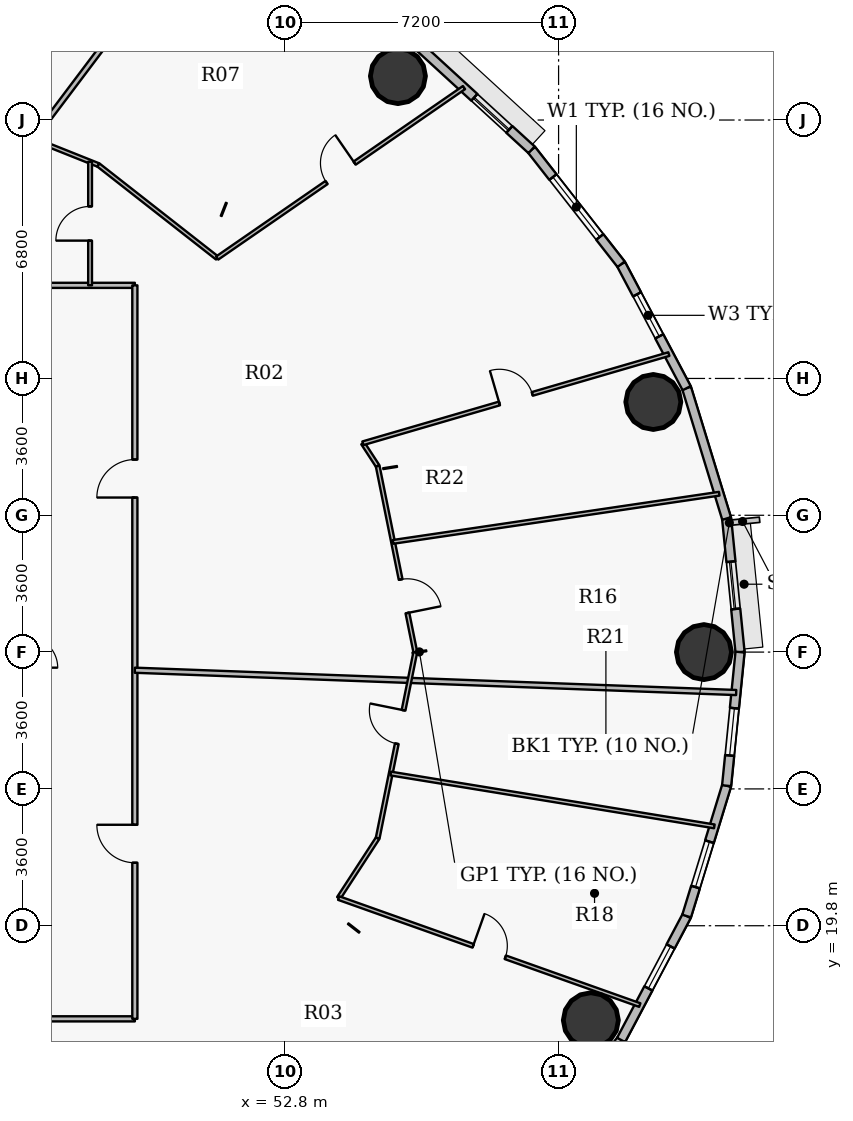
"""IFC4 building model, lengths in metres.
Left out: names, types, materials, properties, quantities, classifications, styles, units other than length and angle.
Written with IfcOpenShell. Run it as: python <this file> out.ifc"""

import sys

from ifc_helpers import new_model, si_unit, direction, frame, frame_2d, origin, origin_2d, place, context, subcontext, project, spatial, rectangle, hollow_circle, extrude, source, transform, mapped, element, fill, save


model = new_model("IFC4")
c1 = context("Model", 3, precision=1e-05, world=origin(), true_north=direction((0.0, 1.0)))
c2 = subcontext(c1, "Body", "Model", "MODEL_VIEW")
j1 = project(units=[si_unit("LENGTHUNIT", "METRE"), si_unit("PLANEANGLEUNIT", "RADIAN")], contexts=[c1])
p1 = place(None, origin())
s1 = spatial("IfcSite", under=j1, at=p1, CompositionType="ELEMENT")
p2 = place(p1, origin())
s2 = spatial("IfcBuilding", under=s1, at=p2, CompositionType="ELEMENT")
p3 = place(p2, frame((0.0, 0.0, 112.2)))
s3 = spatial("IfcBuildingStorey", under=s2, at=p3, CompositionType="ELEMENT", Elevation=112.2)
for number, where, z_axis, x_axis in (
    (1, (63.825, 27.0, 0.0), (0.0, 0.0, 1.0), (1.0, 0.0, 0.0)),
    (2, (62.493, 33.581, 0.0), (0.0, 0.0, 1.0), (1.0, 0.0, 0.0)),
    (3, (55.773, 42.156, 0.0), (0.0, 0.0, 1.0), (1.0, 0.0, 0.0)),
    (4, (60.849, 17.312, 0.0), (0.0, 0.0, 1.0), (1.0, 0.0, 0.0)),
):
    element("IfcColumn", number, at=place(p3, frame(where, z_axis=z_axis, x_axis=x_axis)), inside=s3, PredefinedType="COLUMN", context=c2, shape_type="SweptSolid", body=[
        extrude(hollow_circle(Radius=0.725, WallThickness=0.042, at=origin_2d()), origin(), (0.0, 0.0, 1.0), 3.75),
    ])
p4 = place(p3, frame((64.422, 30.515, 0.0), z_axis=(0.0, 0.0, 1.0), x_axis=(0.099989468229, -0.994988495533, 0.0)))
e5 = element("IfcWall", 5, at=p4, inside=s3, PredefinedType="SOLIDWALL", context=c2, shape_type="SweptSolid", body=[
    extrude(rectangle(XDim=3.533, YDim=0.24, at=frame_2d((1.767, 0.0))), origin(), (0.0, 0.0, 1.0), 3.5),
])
p5 = place(p4, frame((1.142, 0.0, 0.9)))
e6 = element("IfcOpeningElement", 6, at=p5, cuts=e5, PredefinedType="OPENING", context=c2, shape_type="SweptSolid", body=[
    extrude(rectangle(XDim=1.25, YDim=1.65, at=origin_2d()), frame((0.625, 0.13, 0.825), z_axis=(0.0, -1.0, 0.0), x_axis=(1.0, 0.0, 0.0)), (0.0, 0.0, 1.0), 0.26),
])
p6 = place(p3, frame((63.37, 33.945, 0.0), z_axis=(0.0, 0.0, 1.0), x_axis=(0.293124431344, -0.956074300329, 0.0)))
e7 = element("IfcWall", 7, at=p6, inside=s3, PredefinedType="SOLIDWALL", context=c2, shape_type="SweptSolid", body=[
    extrude(rectangle(XDim=3.587, YDim=0.24, at=frame_2d((1.793, 0.0))), origin(), (0.0, 0.0, 1.0), 3.5),
])
p7 = place(p3, frame((61.645, 37.206, 0.0), z_axis=(0.0, 0.0, 1.0), x_axis=(0.467614004126, -0.883932770716, 0.0)))
e8 = element("IfcWall", 8, at=p7, inside=s3, PredefinedType="SOLIDWALL", context=c2, shape_type="SweptSolid", body=[
    extrude(rectangle(XDim=3.689, YDim=0.24, at=frame_2d((1.844, 0.0))), origin(), (0.0, 0.0, 1.0), 3.5),
])
p8 = place(p7, frame((0.896, 0.0, 0.9)))
e9 = element("IfcOpeningElement", 9, at=p8, cuts=e8, PredefinedType="OPENING", context=c2, shape_type="SweptSolid", body=[
    extrude(rectangle(XDim=1.25, YDim=1.65, at=origin_2d()), frame((0.625, 0.13, 0.825), z_axis=(0.0, -1.0, 0.0), x_axis=(1.0, 0.0, 0.0)), (0.0, 0.0, 1.0), 0.26),
])
p9 = place(p3, frame((59.289, 40.217, 0.0), z_axis=(0.0, 0.0, 1.0), x_axis=(0.616272103517, -0.787533297345, 0.0)))
e10 = element("IfcWall", 10, at=p9, inside=s3, PredefinedType="SOLIDWALL", context=c2, shape_type="SweptSolid", body=[
    extrude(rectangle(XDim=3.823, YDim=0.24, at=frame_2d((1.912, 0.0))), origin(), (0.0, 0.0, 1.0), 3.5),
])
p10 = place(p9, frame((0.912, 0.0, 0.9)))
e11 = element("IfcOpeningElement", 11, at=p10, cuts=e10, PredefinedType="OPENING", context=c2, shape_type="SweptSolid", body=[
    extrude(rectangle(XDim=2.0, YDim=1.75, at=origin_2d()), frame((1.0, 0.13, 0.875), z_axis=(0.0, -1.0, 0.0), x_axis=(1.0, 0.0, 0.0)), (0.0, 0.0, 1.0), 0.26),
])
p11 = place(p3, frame((56.358, 42.903, 0.0), z_axis=(0.0, 0.0, 1.0), x_axis=(0.737113356241, -0.675769117414, 0.0)))
e12 = element("IfcWall", 12, at=p11, inside=s3, PredefinedType="SOLIDWALL", context=c2, shape_type="SweptSolid", body=[
    extrude(rectangle(XDim=3.976, YDim=0.24, at=frame_2d((1.988, 0.0))), origin(), (0.0, 0.0, 1.0), 3.5),
])
p12 = place(p11, frame((1.933, 0.0, 0.9)))
e13 = element("IfcOpeningElement", 13, at=p12, cuts=e12, PredefinedType="OPENING", context=c2, shape_type="SweptSolid", body=[
    extrude(rectangle(XDim=1.25, YDim=1.65, at=origin_2d()), frame((0.625, 0.13, 0.825), z_axis=(0.0, -1.0, 0.0), x_axis=(1.0, 0.0, 0.0)), (0.0, 0.0, 1.0), 0.26),
])
p13 = place(p3, frame((61.645, 16.794, 0.0), z_axis=(0.0, 0.0, 1.0), x_axis=(-0.616272103517, -0.787533297345, 0.0)))
e14 = element("IfcWall", 14, at=p13, inside=s3, PredefinedType="SOLIDWALL", context=c2, shape_type="SweptSolid", body=[
    extrude(rectangle(XDim=3.823, YDim=0.24, at=frame_2d((1.912, 0.0))), origin(), (0.0, 0.0, 1.0), 3.5),
])
p14 = place(p3, frame((63.37, 20.055, 0.0), z_axis=(0.0, 0.0, 1.0), x_axis=(-0.467614004126, -0.883932770716, 0.0)))
e15 = element("IfcWall", 15, at=p14, inside=s3, PredefinedType="SOLIDWALL", context=c2, shape_type="SweptSolid", body=[
    extrude(rectangle(XDim=3.689, YDim=0.24, at=frame_2d((1.844, 0.0))), origin(), (0.0, 0.0, 1.0), 3.5),
])
p15 = place(p14, frame((0.904, 0.0, 0.9)))
e16 = element("IfcOpeningElement", 16, at=p15, cuts=e15, PredefinedType="OPENING", context=c2, shape_type="SweptSolid", body=[
    extrude(rectangle(XDim=1.25, YDim=1.65, at=origin_2d()), frame((0.625, 0.13, 0.825), z_axis=(0.0, -1.0, 0.0), x_axis=(1.0, 0.0, 0.0)), (0.0, 0.0, 1.0), 0.26),
])
p16 = place(p3, frame((64.422, 23.485, 0.0), z_axis=(0.0, 0.0, 1.0), x_axis=(-0.293124431344, -0.956074300329, 0.0)))
e17 = element("IfcWall", 17, at=p16, inside=s3, PredefinedType="SOLIDWALL", context=c2, shape_type="SweptSolid", body=[
    extrude(rectangle(XDim=3.587, YDim=0.24, at=frame_2d((1.793, 0.0))), origin(), (0.0, 0.0, 1.0), 3.5),
])
p17 = place(p16, frame((1.541, 0.0, 0.9)))
e18 = element("IfcOpeningElement", 18, at=p17, cuts=e17, PredefinedType="OPENING", context=c2, shape_type="SweptSolid", body=[
    extrude(rectangle(XDim=1.25, YDim=1.65, at=origin_2d()), frame((0.625, 0.13, 0.825), z_axis=(0.0, -1.0, 0.0), x_axis=(1.0, 0.0, 0.0)), (0.0, 0.0, 1.0), 0.26),
])
p18 = place(p3, frame((64.775, 27.0, 0.0), z_axis=(0.0, 0.0, 1.0), x_axis=(-0.099989468229, -0.994988495533, 0.0)))
e19 = element("IfcWall", 19, at=p18, inside=s3, PredefinedType="SOLIDWALL", context=c2, shape_type="SweptSolid", body=[
    extrude(rectangle(XDim=3.533, YDim=0.24, at=frame_2d((1.767, 0.0))), origin(), (0.0, 0.0, 1.0), 3.5),
])
p19 = place(p18, frame((1.484, 0.0, 0.9)))
e20 = element("IfcOpeningElement", 20, at=p19, cuts=e19, PredefinedType="OPENING", context=c2, shape_type="SweptSolid", body=[
    extrude(rectangle(XDim=1.25, YDim=1.65, at=origin_2d()), frame((0.625, 0.13, 0.825), z_axis=(0.0, -1.0, 0.0), x_axis=(1.0, 0.0, 0.0)), (0.0, 0.0, 1.0), 0.26),
])
p20 = place(p3, frame((36.042, 36.65, 0.0), z_axis=(0.0, 0.0, 1.0), x_axis=(1.0, 0.0, 0.0)))
e21 = element("IfcWall", 21, at=p20, inside=s3, PredefinedType="PARTITIONING", context=c2, shape_type="SweptSolid", body=[
    extrude(rectangle(XDim=12.808, YDim=0.135, at=frame_2d((6.404, 0.0))), origin(), (0.0, 0.0, 1.0), 2.935),
])
p21 = place(p20, frame((3.135, 0.0, 0.0)))
e22 = element("IfcOpeningElement", 22, at=p21, cuts=e21, PredefinedType="OPENING", context=c2, shape_type="SweptSolid", body=[
    extrude(rectangle(XDim=1.0, YDim=2.15, at=origin_2d()), frame((0.5, 0.078, 1.075), z_axis=(0.0, -1.0, 0.0), x_axis=(1.0, 0.0, 0.0)), (0.0, 0.0, 1.0), 0.155),
])
p22 = place(p3, frame((38.477, 17.35, 0.0), z_axis=(0.0, 0.0, 1.0), x_axis=(1.0, 0.0, 0.0)))
e23 = element("IfcWall", 23, at=p22, inside=s3, PredefinedType="PARTITIONING", context=c2, shape_type="SweptSolid", body=[
    extrude(rectangle(XDim=10.373, YDim=0.135, at=frame_2d((5.187, 0.0))), origin(), (0.0, 0.0, 1.0), 2.935),
])
p23 = place(p3, frame((42.251, 42.066, 0.0), z_axis=(0.0, 0.0, 1.0), x_axis=(0.9288090756, -0.370558633798, 0.0)))
e24 = element("IfcWall", 24, at=p23, inside=s3, PredefinedType="PARTITIONING", context=c2, shape_type="SweptSolid", body=[
    extrude(rectangle(XDim=6.072, YDim=0.1, at=frame_2d((3.036, 0.0))), origin(), (0.0, 0.0, 1.0), 2.935),
])
p24 = place(p3, frame((43.272, 36.65, 0.0), z_axis=(0.0, 0.0, 1.0), x_axis=(0.601821582461, 0.798630567211, 0.0)))
e25 = element("IfcWall", 25, at=p24, inside=s3, PredefinedType="PARTITIONING", context=c2, shape_type="SweptSolid", body=[
    extrude(rectangle(XDim=12.127, YDim=0.135, at=frame_2d((6.063, 0.0))), origin(), (0.0, 0.0, 1.0), 2.935),
])
p25 = place(p3, frame((47.672, 36.65, 0.0), z_axis=(0.0, 0.0, 1.0), x_axis=(0.0, 1.0, 0.0)))
e26 = element("IfcWall", 26, at=p25, inside=s3, PredefinedType="PARTITIONING", context=c2, shape_type="SweptSolid", body=[
    extrude(rectangle(XDim=3.253, YDim=0.1, at=frame_2d((1.626, 0.0))), origin(), (0.0, 0.0, 1.0), 2.985),
])
p26 = place(p25, frame((1.177, 0.0, 0.0)))
e27 = element("IfcOpeningElement", 27, at=p26, cuts=e26, PredefinedType="OPENING", context=c2, shape_type="SweptSolid", body=[
    extrude(rectangle(XDim=0.9, YDim=2.1, at=origin_2d()), frame((0.45, 0.06, 1.05), z_axis=(0.0, -1.0, 0.0), x_axis=(1.0, 0.0, 0.0)), (0.0, 0.0, 1.0), 0.12),
])
p27 = place(p3, frame((47.891, 39.816, 0.0), z_axis=(0.0, 0.0, 1.0), x_axis=(0.787331052764, -0.616530464254, 0.0)))
e28 = element("IfcWall", 28, at=p27, inside=s3, PredefinedType="PARTITIONING", context=c2, shape_type="SweptSolid", body=[
    extrude(rectangle(XDim=3.969, YDim=0.1, at=frame_2d((1.985, 0.0))), origin(), (0.0, 0.0, 1.0), 2.935),
])
p28 = place(p3, frame((48.85, 17.35, 0.0), z_axis=(0.0, 0.0, 1.0), x_axis=(0.0, 1.0, 0.0)))
e29 = element("IfcWall", 29, at=p28, inside=s3, PredefinedType="PARTITIONING", context=c2, shape_type="SweptSolid", body=[
    extrude(rectangle(XDim=19.3, YDim=0.135, at=frame_2d((9.65, 0.0))), origin(), (0.0, 0.0, 1.0), 2.935),
])
p29 = place(p28, frame((4.107, 0.0, 0.0)))
e30 = element("IfcOpeningElement", 30, at=p29, cuts=e29, PredefinedType="OPENING", context=c2, shape_type="SweptSolid", body=[
    extrude(rectangle(XDim=1.0, YDim=2.15, at=origin_2d()), frame((0.5, 0.078, 1.075), z_axis=(0.0, -1.0, 0.0), x_axis=(1.0, 0.0, 0.0)), (0.0, 0.0, 1.0), 0.155),
])
p30 = place(p28, frame((13.717, 0.0, 0.0)))
e31 = element("IfcOpeningElement", 31, at=p30, cuts=e29, PredefinedType="OPENING", context=c2, shape_type="SweptSolid", body=[
    extrude(rectangle(XDim=1.0, YDim=2.15, at=origin_2d()), frame((0.5, 0.078, 1.075), z_axis=(0.0, -1.0, 0.0), x_axis=(1.0, 0.0, 0.0)), (0.0, 0.0, 1.0), 0.155),
])
p31 = place(p3, frame((48.85, 26.523, 0.0), z_axis=(0.0, 0.0, 1.0), x_axis=(0.999312212169, -0.03708237599, 0.0)))
e32 = element("IfcWall", 32, at=p31, inside=s3, PredefinedType="PARTITIONING", context=c2, shape_type="SweptSolid", body=[
    extrude(rectangle(XDim=15.834, YDim=0.135, at=frame_2d((7.917, 0.0))), origin(), (0.0, 0.0, 1.0), 2.935),
])
p32 = place(p3, frame((51.016, 37.368, 0.0), z_axis=(0.0, 0.0, 1.0), x_axis=(0.822878649823, 0.568217148338, 0.0)))
e33 = element("IfcWall", 33, at=p32, inside=s3, PredefinedType="PARTITIONING", context=c2, shape_type="SweptSolid", body=[
    extrude(rectangle(XDim=7.893, YDim=0.1, at=frame_2d((3.946, 0.0))), origin(), (0.0, 0.0, 1.0), 2.935),
])
p33 = place(p32, frame((3.497, 0.0, 0.0)))
e34 = element("IfcOpeningElement", 34, at=p33, cuts=e33, PredefinedType="OPENING", context=c2, shape_type="SweptSolid", body=[
    extrude(rectangle(XDim=0.9, YDim=2.1, at=origin_2d()), frame((0.45, 0.06, 1.05), z_axis=(0.0, -1.0, 0.0), x_axis=(1.0, 0.0, 0.0)), (0.0, 0.0, 1.0), 0.12),
])
p34 = place(p3, frame((54.214, 20.528, 0.0), z_axis=(0.0, 0.0, 1.0), x_axis=(0.545444312607, 0.838147064568, 0.0)))
e35 = element("IfcWall", 35, at=p34, inside=s3, PredefinedType="PARTITIONING", context=c2, shape_type="SweptSolid", body=[
    extrude(rectangle(XDim=1.882, YDim=0.1, at=frame_2d((0.941, 0.0))), origin(), (0.0, 0.0, 1.0), 3.5),
])
p35 = place(p3, frame((54.214, 20.528, 0.0), z_axis=(0.0, 0.0, 1.0), x_axis=(0.942277402903, -0.334833236073, 0.0)))
e36 = element("IfcWall", 36, at=p35, inside=s3, PredefinedType="PARTITIONING", context=c2, shape_type="SweptSolid", body=[
    extrude(rectangle(XDim=8.408, YDim=0.1, at=frame_2d((4.204, 0.0))), origin(), (0.0, 0.0, 1.0), 2.935),
])
p36 = place(p35, frame((3.754, 0.0, 0.0)))
e37 = element("IfcOpeningElement", 37, at=p36, cuts=e36, PredefinedType="OPENING", context=c2, shape_type="SweptSolid", body=[
    extrude(rectangle(XDim=0.9, YDim=2.1, at=origin_2d()), frame((0.45, 0.06, 1.05), z_axis=(0.0, -1.0, 0.0), x_axis=(1.0, 0.0, 0.0)), (0.0, 0.0, 1.0), 0.12),
])
p37 = place(p3, frame((54.85, 32.494, 0.0), z_axis=(0.0, 0.0, 1.0), x_axis=(0.545288355623, -0.838248536665, 0.0)))
e38 = element("IfcWall", 38, at=p37, inside=s3, PredefinedType="PARTITIONING", context=c2, shape_type="SweptSolid", body=[
    extrude(rectangle(XDim=0.715, YDim=0.1, at=frame_2d((0.357, 0.0))), origin(), (0.0, 0.0, 1.0), 2.935),
])
p38 = place(p3, frame((54.85, 32.494, 0.0), z_axis=(0.0, 0.0, 1.0), x_axis=(0.960056058733, 0.279807727002, 0.0)))
e39 = element("IfcWall", 39, at=p38, inside=s3, PredefinedType="PARTITIONING", context=c2, shape_type="SweptSolid", body=[
    extrude(rectangle(XDim=8.387, YDim=0.1, at=frame_2d((4.193, 0.0))), origin(), (0.0, 0.0, 1.0), 2.935),
])
p39 = place(p38, frame((3.743, 0.0, 0.0)))
e40 = element("IfcOpeningElement", 40, at=p39, cuts=e39, PredefinedType="OPENING", context=c2, shape_type="SweptSolid", body=[
    extrude(rectangle(XDim=0.9, YDim=2.1, at=origin_2d()), frame((0.45, 0.06, 1.05), z_axis=(0.0, -1.0, 0.0), x_axis=(1.0, 0.0, 0.0)), (0.0, 0.0, 1.0), 0.12),
])
p40 = place(p3, frame((55.24, 22.105, 0.0), z_axis=(0.0, 0.0, 1.0), x_axis=(0.198230919145, 0.980155346205, 0.0)))
e41 = element("IfcWall", 41, at=p40, inside=s3, PredefinedType="PARTITIONING", context=c2, shape_type="SweptSolid", body=[
    extrude(rectangle(XDim=4.994, YDim=0.1, at=frame_2d((2.497, 0.0))), origin(), (0.0, 0.0, 1.0), 2.935),
])
p41 = place(p40, frame((2.534, 0.0, 0.0)))
e42 = element("IfcOpeningElement", 42, at=p41, cuts=e41, PredefinedType="OPENING", context=c2, shape_type="SweptSolid", body=[
    extrude(rectangle(XDim=0.9, YDim=2.1, at=origin_2d()), frame((0.45, 0.06, 1.05), z_axis=(0.0, -1.0, 0.0), x_axis=(1.0, 0.0, 0.0)), (0.0, 0.0, 1.0), 0.12),
])
p42 = place(p3, frame((55.24, 31.895, 0.0), z_axis=(0.0, 0.0, 1.0), x_axis=(0.19822142127, -0.980157267049, 0.0)))
e43 = element("IfcWall", 43, at=p42, inside=s3, PredefinedType="PARTITIONING", context=c2, shape_type="SweptSolid", body=[
    extrude(rectangle(XDim=4.994, YDim=0.1, at=frame_2d((2.497, 0.0))), origin(), (0.0, 0.0, 1.0), 2.935),
])
p43 = place(p42, frame((3.045, 0.0, 0.0)))
e44 = element("IfcOpeningElement", 44, at=p43, cuts=e43, PredefinedType="OPENING", context=c2, shape_type="SweptSolid", body=[
    extrude(rectangle(XDim=0.9, YDim=2.1, at=origin_2d()), frame((0.45, 0.06, 1.05), z_axis=(0.0, -1.0, 0.0), x_axis=(1.0, 0.0, 0.0)), (0.0, 0.0, 1.0), 0.12),
])
p44 = place(p3, frame((55.583, 23.804, 0.0), z_axis=(0.0, 0.0, 1.0), x_axis=(0.986943531615, -0.161066648946, 0.0)))
e45 = element("IfcWall", 45, at=p44, inside=s3, PredefinedType="PARTITIONING", context=c2, shape_type="SweptSolid", body=[
    extrude(rectangle(XDim=8.628, YDim=0.1, at=frame_2d((4.314, 0.0))), origin(), (0.0, 0.0, 1.0), 2.935),
])
p45 = place(p3, frame((55.644, 29.9, 0.0), z_axis=(0.0, 0.0, 1.0), x_axis=(0.989279170557, 0.146036716969, 0.0)))
e46 = element("IfcWall", 46, at=p45, inside=s3, PredefinedType="PARTITIONING", context=c2, shape_type="SweptSolid", body=[
    extrude(rectangle(XDim=8.677, YDim=0.1, at=frame_2d((4.338, 0.0))), origin(), (0.0, 0.0, 1.0), 2.935),
])
m1 = source(origin(), c2, "Body", "SweptSolid", [
    extrude(rectangle(XDim=1.25, YDim=1.65, at=origin_2d()), frame((0.625, 0.03, 0.825), z_axis=(0.0, -1.0, 0.0), x_axis=(1.0, 0.0, 0.0)), (0.0, 0.0, 1.0), 0.06),
])
p46 = place(p8, origin())
e47 = element("IfcWindow", 47, at=p46, inside=s3, PartitioningType="SINGLE_PANEL", PredefinedType="WINDOW", context=c2, shape_type="MappedRepresentation", body=[
    mapped(m1, transform((0.0, 0.0, 0.0), x_axis=(1.0, 0.0, 0.0), y_axis=(0.0, 1.0, 0.0), z_axis=(0.0, 0.0, 1.0), scale=1.0)),
])
fill(e9, e47)
m2 = source(origin(), c2, "Body", "SweptSolid", [
    extrude(rectangle(XDim=2.0, YDim=1.75, at=origin_2d()), frame((1.0, 0.03, 0.875), z_axis=(0.0, -1.0, 0.0), x_axis=(1.0, 0.0, 0.0)), (0.0, 0.0, 1.0), 0.06),
])
p47 = place(p10, origin())
e48 = element("IfcWindow", 48, at=p47, inside=s3, PartitioningType="DOUBLE_PANEL_VERTICAL", PredefinedType="WINDOW", context=c2, shape_type="MappedRepresentation", body=[
    mapped(m2, transform((0.0, 0.0, 0.0), x_axis=(1.0, 0.0, 0.0), y_axis=(0.0, 1.0, 0.0), z_axis=(0.0, 0.0, 1.0), scale=1.0)),
])
fill(e11, e48)
p48 = place(p12, origin())
e49 = element("IfcWindow", 49, at=p48, inside=s3, PartitioningType="SINGLE_PANEL", PredefinedType="WINDOW", context=c2, shape_type="MappedRepresentation", body=[
    mapped(m1, transform((0.0, 0.0, 0.0), x_axis=(1.0, 0.0, 0.0), y_axis=(0.0, 1.0, 0.0), z_axis=(0.0, 0.0, 1.0), scale=1.0)),
])
fill(e13, e49)
p49 = place(p15, origin())
e50 = element("IfcWindow", 50, at=p49, inside=s3, PartitioningType="SINGLE_PANEL", PredefinedType="WINDOW", context=c2, shape_type="MappedRepresentation", body=[
    mapped(m1, transform((0.0, 0.0, 0.0), x_axis=(1.0, 0.0, 0.0), y_axis=(0.0, 1.0, 0.0), z_axis=(0.0, 0.0, 1.0), scale=1.0)),
])
fill(e16, e50)
p50 = place(p17, origin())
e51 = element("IfcWindow", 51, at=p50, inside=s3, PartitioningType="SINGLE_PANEL", PredefinedType="WINDOW", context=c2, shape_type="MappedRepresentation", body=[
    mapped(m1, transform((0.0, 0.0, 0.0), x_axis=(1.0, 0.0, 0.0), y_axis=(0.0, 1.0, 0.0), z_axis=(0.0, 0.0, 1.0), scale=1.0)),
])
fill(e18, e51)
p51 = place(p19, origin())
e52 = element("IfcWindow", 52, at=p51, inside=s3, PartitioningType="SINGLE_PANEL", PredefinedType="WINDOW", context=c2, shape_type="MappedRepresentation", body=[
    mapped(m1, transform((0.0, 0.0, 0.0), x_axis=(1.0, 0.0, 0.0), y_axis=(0.0, 1.0, 0.0), z_axis=(0.0, 0.0, 1.0), scale=1.0)),
])
fill(e20, e52)
p52 = place(p5, origin())
e53 = element("IfcWindow", 53, at=p52, inside=s3, PartitioningType="SINGLE_PANEL", PredefinedType="WINDOW", context=c2, shape_type="MappedRepresentation", body=[
    mapped(m1, transform((0.0, 0.0, 0.0), x_axis=(1.0, 0.0, 0.0), y_axis=(0.0, 1.0, 0.0), z_axis=(0.0, 0.0, 1.0), scale=1.0)),
])
fill(e6, e53)
m3 = source(origin(), c2, "Body", "SweptSolid", [
    extrude(rectangle(XDim=1.0, YDim=2.15, at=origin_2d()), frame((0.5, 0.025, 1.075), z_axis=(0.0, -1.0, 0.0), x_axis=(1.0, 0.0, 0.0)), (0.0, 0.0, 1.0), 0.05),
])
p53 = place(p29, origin())
e54 = element("IfcDoor", 54, at=p53, inside=s3, OperationType="SINGLE_SWING_RIGHT", PredefinedType="DOOR", context=c2, shape_type="MappedRepresentation", body=[
    mapped(m3, transform((0.0, 0.0, 0.0), x_axis=(1.0, 0.0, 0.0), y_axis=(0.0, 1.0, 0.0), z_axis=(0.0, 0.0, 1.0), scale=1.0)),
])
fill(e30, e54)
m4 = source(origin(), c2, "Body", "SweptSolid", [
    extrude(rectangle(XDim=0.9, YDim=2.1, at=origin_2d()), frame((0.45, 0.025, 1.05), z_axis=(0.0, -1.0, 0.0), x_axis=(1.0, 0.0, 0.0)), (0.0, 0.0, 1.0), 0.05),
])
p54 = place(p36, origin())
e55 = element("IfcDoor", 55, at=p54, inside=s3, OperationType="SINGLE_SWING_LEFT", PredefinedType="DOOR", context=c2, shape_type="MappedRepresentation", body=[
    mapped(m4, transform((0.0, 0.0, 0.0), x_axis=(1.0, 0.0, 0.0), y_axis=(0.0, 1.0, 0.0), z_axis=(0.0, 0.0, 1.0), scale=1.0)),
])
fill(e37, e55)
p55 = place(p41, origin())
e56 = element("IfcDoor", 56, at=p55, inside=s3, OperationType="SINGLE_SWING_RIGHT", PredefinedType="DOOR", context=c2, shape_type="MappedRepresentation", body=[
    mapped(m4, transform((0.0, 0.0, 0.0), x_axis=(1.0, 0.0, 0.0), y_axis=(0.0, 1.0, 0.0), z_axis=(0.0, 0.0, 1.0), scale=1.0)),
])
fill(e42, e56)
p56 = place(p30, origin())
e57 = element("IfcDoor", 57, at=p56, inside=s3, OperationType="SINGLE_SWING_LEFT", PredefinedType="DOOR", context=c2, shape_type="MappedRepresentation", body=[
    mapped(m3, transform((0.0, 0.0, 0.0), x_axis=(1.0, 0.0, 0.0), y_axis=(0.0, 1.0, 0.0), z_axis=(0.0, 0.0, 1.0), scale=1.0)),
])
fill(e31, e57)
p57 = place(p43, origin())
e58 = element("IfcDoor", 58, at=p57, inside=s3, OperationType="SINGLE_SWING_RIGHT", PredefinedType="DOOR", context=c2, shape_type="MappedRepresentation", body=[
    mapped(m4, transform((0.0, 0.0, 0.0), x_axis=(1.0, 0.0, 0.0), y_axis=(0.0, 1.0, 0.0), z_axis=(0.0, 0.0, 1.0), scale=1.0)),
])
fill(e44, e58)
p58 = place(p39, origin())
e59 = element("IfcDoor", 59, at=p58, inside=s3, OperationType="SINGLE_SWING_LEFT", PredefinedType="DOOR", context=c2, shape_type="MappedRepresentation", body=[
    mapped(m4, transform((0.0, 0.0, 0.0), x_axis=(1.0, 0.0, 0.0), y_axis=(0.0, 1.0, 0.0), z_axis=(0.0, 0.0, 1.0), scale=1.0)),
])
fill(e40, e59)
p59 = place(p33, origin())
e60 = element("IfcDoor", 60, at=p59, inside=s3, OperationType="SINGLE_SWING_RIGHT", PredefinedType="DOOR", context=c2, shape_type="MappedRepresentation", body=[
    mapped(m4, transform((0.0, 0.0, 0.0), x_axis=(1.0, 0.0, 0.0), y_axis=(0.0, 1.0, 0.0), z_axis=(0.0, 0.0, 1.0), scale=1.0)),
])
fill(e34, e60)
p60 = place(p26, origin())
e61 = element("IfcDoor", 61, at=p60, inside=s3, OperationType="SINGLE_SWING_LEFT", PredefinedType="DOOR", context=c2, shape_type="MappedRepresentation", body=[
    mapped(m4, transform((0.0, 0.0, 0.0), x_axis=(1.0, 0.0, 0.0), y_axis=(0.0, 1.0, 0.0), z_axis=(0.0, 0.0, 1.0), scale=1.0)),
])
fill(e27, e61)
save(model, sys.argv[1])
